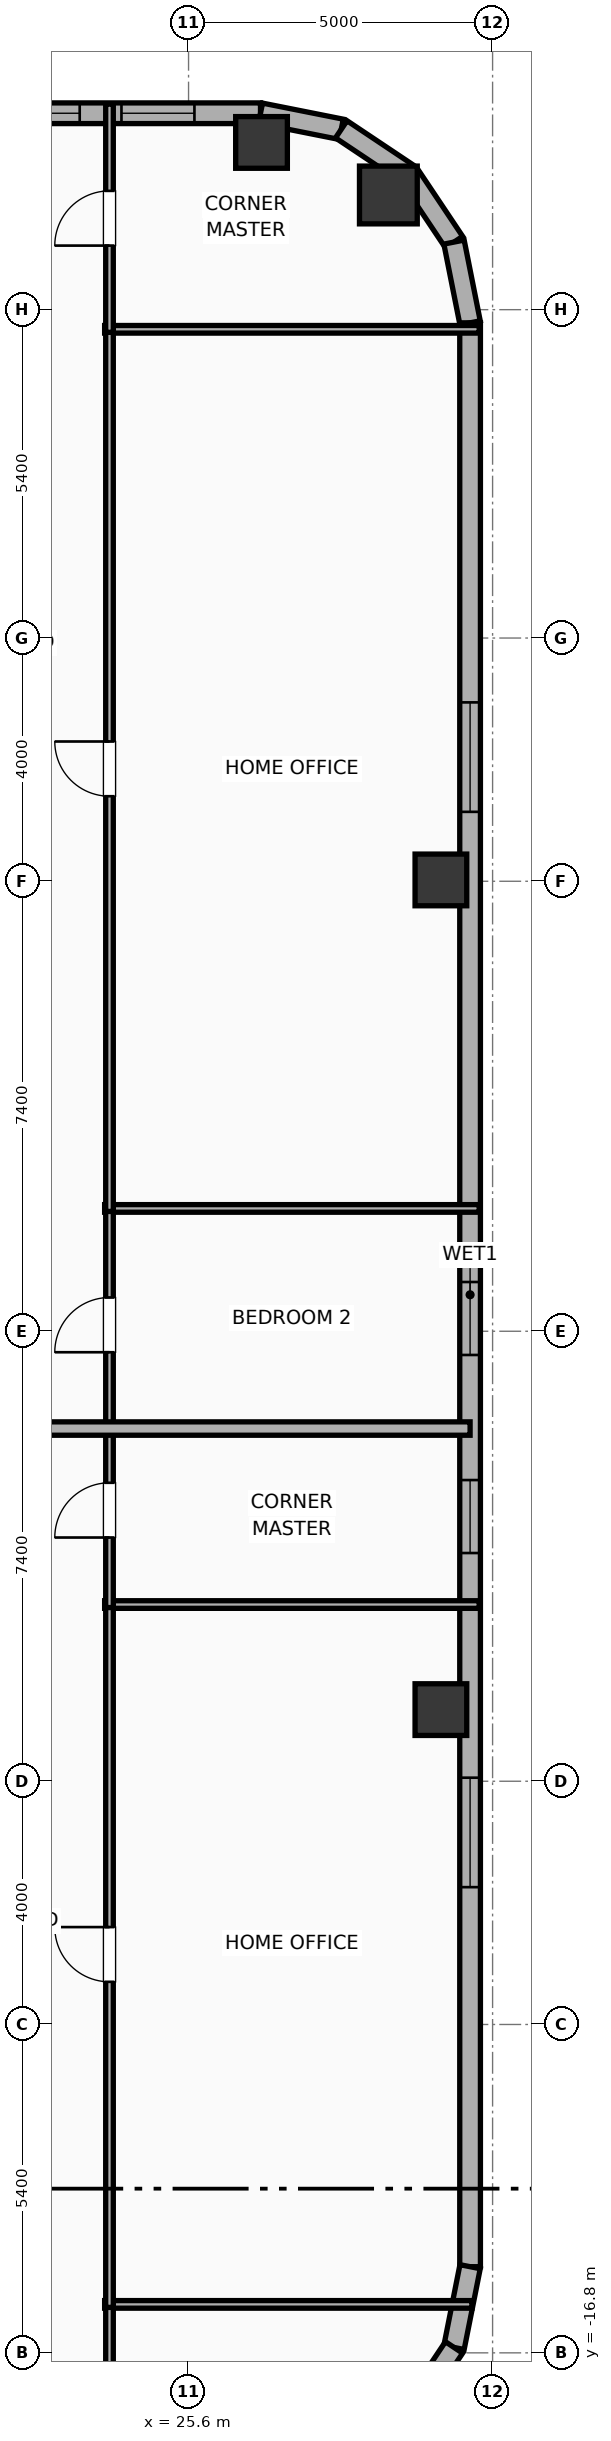
"""IFC4 building model, lengths in metres.
Left out: names, types, materials, properties, quantities, classifications, styles, units other than length and angle.
Written with IfcOpenShell. Run it as: python <this file> out.ifc"""

import sys

from ifc_helpers import new_model, si_unit, direction, frame, frame_2d, origin, origin_2d, place, context, subcontext, project, spatial, rectangle, hollow_rectangle, hollow_circle, extrude, element, fill, save


model = new_model("IFC4")
c1 = context("Model", 3, precision=1e-05, world=origin(), true_north=direction((0.0, 1.0)))
c2 = subcontext(c1, "Body", "Model", "MODEL_VIEW")
j1 = project(units=[si_unit("LENGTHUNIT", "METRE"), si_unit("PLANEANGLEUNIT", "RADIAN")], contexts=[c1])
p1 = place(None, origin())
s1 = spatial("IfcSite", under=j1, at=p1, CompositionType="ELEMENT")
p2 = place(p1, origin())
s2 = spatial("IfcBuilding", under=s1, at=p2, CompositionType="ELEMENT")
p3 = place(p2, frame((0.0, 0.0, 200.2)))
s3 = spatial("IfcBuildingStorey", under=s2, at=p3, CompositionType="ELEMENT", Elevation=200.2)
for number, where, z_axis, x_axis in (
    (1, (29.75, -6.222, 0.0), (0.0, 0.0, 1.0), (1.0, 0.0, 0.0)),
    (2, (29.75, 7.422, 0.0), (0.0, 0.0, 1.0), (1.0, 0.0, 0.0)),
):
    element("IfcColumn", number, at=place(p3, frame(where, z_axis=z_axis, x_axis=x_axis)), inside=s3, PredefinedType="COLUMN", context=c2, shape_type="SweptSolid", body=[
        extrude(hollow_rectangle(XDim=0.85, YDim=0.85, WallThickness=0.028, at=origin_2d()), origin(), (0.0, 0.0, 1.0), 3.9),
    ])
p4 = place(p3, frame((28.886, 18.686, 0.0), z_axis=(0.0, 0.0, 1.0), x_axis=(1.0, 0.0, 0.0)))
e3 = element("IfcColumn", 3, at=p4, inside=s3, PredefinedType="COLUMN", context=c2, shape_type="SweptSolid", body=[
    extrude(hollow_circle(Radius=0.475, WallThickness=0.032, at=origin_2d()), origin(), (0.0, 0.0, 1.0), 3.9),
])
p5 = place(p3, frame((26.8, 19.55, 0.0), z_axis=(0.0, 0.0, 1.0), x_axis=(1.0, 0.0, 0.0)))
e4 = element("IfcColumn", 4, at=p5, inside=s3, PredefinedType="COLUMN", context=c2, shape_type="SweptSolid", body=[
    extrude(hollow_rectangle(XDim=0.85, YDim=0.85, WallThickness=0.028, at=origin_2d()), origin(), (0.0, 0.0, 1.0), 3.9),
])
p6 = place(p3, frame((-22.783, 20.03, 0.0), z_axis=(0.0, 0.0, 1.0), x_axis=(1.0, 0.0, 0.0)))
e5 = element("IfcWall", 5, at=p6, inside=s3, PredefinedType="ELEMENTEDWALL", context=c2, shape_type="SweptSolid", body=[
    extrude(rectangle(XDim=49.566, YDim=0.34, at=frame_2d((24.783, 0.0))), origin(), (0.0, 0.0, 1.0), 2.54),
])
p7 = place(p6, frame((6.211, 0.0, 0.75)))
e6 = element("IfcOpeningElement", 6, at=p7, cuts=e5, PredefinedType="OPENING", context=c2, shape_type="SweptSolid", body=[
    extrude(rectangle(XDim=2.4, YDim=1.63, at=frame_2d((1.2, 0.815))), frame((0.0, 0.18, 0.0), z_axis=(0.0, -1.0, 0.0), x_axis=(1.0, 0.0, 0.0)), (0.0, 0.0, 1.0), 0.36),
])
p8 = place(p6, frame((23.583, 0.0, 0.75)))
e7 = element("IfcOpeningElement", 7, at=p8, cuts=e5, PredefinedType="OPENING", context=c2, shape_type="SweptSolid", body=[
    extrude(rectangle(XDim=2.4, YDim=1.63, at=frame_2d((1.2, 0.815))), frame((0.0, 0.18, 0.0), z_axis=(0.0, -1.0, 0.0), x_axis=(1.0, 0.0, 0.0)), (0.0, 0.0, 1.0), 0.36),
])
p9 = place(p6, frame((3.893, 0.0, 0.75)))
e8 = element("IfcOpeningElement", 8, at=p9, cuts=e5, PredefinedType="OPENING", context=c2, shape_type="SweptSolid", body=[
    extrude(rectangle(XDim=1.2, YDim=1.63, at=frame_2d((0.6, 0.815))), frame((0.0, 0.18, 0.0), z_axis=(0.0, -1.0, 0.0), x_axis=(1.0, 0.0, 0.0)), (0.0, 0.0, 1.0), 0.36),
])
p10 = place(p6, frame((11.273, 0.0, 0.75)))
e9 = element("IfcOpeningElement", 9, at=p10, cuts=e5, PredefinedType="OPENING", context=c2, shape_type="SweptSolid", body=[
    extrude(rectangle(XDim=1.2, YDim=1.63, at=frame_2d((0.6, 0.815))), frame((0.0, 0.18, 0.0), z_axis=(0.0, -1.0, 0.0), x_axis=(1.0, 0.0, 0.0)), (0.0, 0.0, 1.0), 0.36),
])
p11 = place(p6, frame((31.889, 0.0, 0.75)))
e10 = element("IfcOpeningElement", 10, at=p11, cuts=e5, PredefinedType="OPENING", context=c2, shape_type="SweptSolid", body=[
    extrude(rectangle(XDim=1.2, YDim=1.63, at=frame_2d((0.6, 0.815))), frame((0.0, 0.18, 0.0), z_axis=(0.0, -1.0, 0.0), x_axis=(1.0, 0.0, 0.0)), (0.0, 0.0, 1.0), 0.36),
])
p12 = place(p6, frame((34.719, 0.0, 0.75)))
e11 = element("IfcOpeningElement", 11, at=p12, cuts=e5, PredefinedType="OPENING", context=c2, shape_type="SweptSolid", body=[
    extrude(rectangle(XDim=1.2, YDim=1.63, at=frame_2d((0.6, 0.815))), frame((0.0, 0.18, 0.0), z_axis=(0.0, -1.0, 0.0), x_axis=(1.0, 0.0, 0.0)), (0.0, 0.0, 1.0), 0.36),
])
p13 = place(p6, frame((37.823, 0.0, 0.75)))
e12 = element("IfcOpeningElement", 12, at=p13, cuts=e5, PredefinedType="OPENING", context=c2, shape_type="SweptSolid", body=[
    extrude(rectangle(XDim=1.2, YDim=1.63, at=frame_2d((0.6, 0.815))), frame((0.0, 0.18, 0.0), z_axis=(0.0, -1.0, 0.0), x_axis=(1.0, 0.0, 0.0)), (0.0, 0.0, 1.0), 0.36),
])
p14 = place(p6, frame((16.113, 0.0, 0.75)))
e13 = element("IfcOpeningElement", 13, at=p14, cuts=e5, PredefinedType="OPENING", context=c2, shape_type="SweptSolid", body=[
    extrude(rectangle(XDim=1.2, YDim=1.63, at=frame_2d((0.6, 0.815))), frame((0.0, 0.18, 0.0), z_axis=(0.0, -1.0, 0.0), x_axis=(1.0, 0.0, 0.0)), (0.0, 0.0, 1.0), 0.36),
])
p15 = place(p6, frame((20.513, 0.0, 0.75)))
e14 = element("IfcOpeningElement", 14, at=p15, cuts=e5, PredefinedType="OPENING", context=c2, shape_type="SweptSolid", body=[
    extrude(rectangle(XDim=1.2, YDim=1.63, at=frame_2d((0.6, 0.815))), frame((0.0, 0.18, 0.0), z_axis=(0.0, -1.0, 0.0), x_axis=(1.0, 0.0, 0.0)), (0.0, 0.0, 1.0), 0.36),
])
p16 = place(p6, frame((27.893, 0.0, 0.75)))
e15 = element("IfcOpeningElement", 15, at=p16, cuts=e5, PredefinedType="OPENING", context=c2, shape_type="SweptSolid", body=[
    extrude(rectangle(XDim=1.2, YDim=1.63, at=frame_2d((0.6, 0.815))), frame((0.0, 0.18, 0.0), z_axis=(0.0, -1.0, 0.0), x_axis=(1.0, 0.0, 0.0)), (0.0, 0.0, 1.0), 0.36),
])
p17 = place(p6, frame((45.393, 0.0, 0.75)))
e16 = element("IfcOpeningElement", 16, at=p17, cuts=e5, PredefinedType="OPENING", context=c2, shape_type="SweptSolid", body=[
    extrude(rectangle(XDim=1.2, YDim=1.63, at=frame_2d((0.6, 0.815))), frame((0.0, 0.18, 0.0), z_axis=(0.0, -1.0, 0.0), x_axis=(1.0, 0.0, 0.0)), (0.0, 0.0, 1.0), 0.36),
])
p18 = place(p6, frame((47.28, 0.0, 0.75)))
e17 = element("IfcOpeningElement", 17, at=p18, cuts=e5, PredefinedType="OPENING", context=c2, shape_type="SweptSolid", body=[
    extrude(rectangle(XDim=1.2, YDim=1.63, at=frame_2d((0.6, 0.815))), frame((0.0, 0.18, 0.0), z_axis=(0.0, -1.0, 0.0), x_axis=(1.0, 0.0, 0.0)), (0.0, 0.0, 1.0), 0.36),
])
p19 = place(p3, frame((26.783, 20.03, 0.0), z_axis=(0.0, 0.0, 1.0), x_axis=(0.980788153188, -0.195075878998, 0.0)))
e18 = element("IfcWall", 18, at=p19, inside=s3, PredefinedType="ELEMENTEDWALL", context=c2, shape_type="SweptSolid", body=[
    extrude(rectangle(XDim=1.354, YDim=0.34, at=frame_2d((0.677, 0.0))), origin(), (0.0, 0.0, 1.0), 2.54),
])
p20 = place(p3, frame((28.111, 19.766, 0.0), z_axis=(0.0, 0.0, 1.0), x_axis=(0.831403586725, -0.555669034571, 0.0)))
e19 = element("IfcWall", 19, at=p20, inside=s3, PredefinedType="ELEMENTEDWALL", context=c2, shape_type="SweptSolid", body=[
    extrude(rectangle(XDim=1.337, YDim=0.34, at=frame_2d((0.668, 0.0))), origin(), (0.0, 0.0, 1.0), 2.54),
])
p21 = place(p3, frame((29.223, 19.023, 0.0), z_axis=(0.0, 0.0, 1.0), x_axis=(0.555669034571, -0.831403586725, 0.0)))
e20 = element("IfcWall", 20, at=p21, inside=s3, PredefinedType="ELEMENTEDWALL", context=c2, shape_type="SweptSolid", body=[
    extrude(rectangle(XDim=1.337, YDim=0.34, at=frame_2d((0.668, 0.0))), origin(), (0.0, 0.0, 1.0), 3.65),
])
p22 = place(p3, frame((29.966, 17.911, 0.0), z_axis=(0.0, 0.0, 1.0), x_axis=(0.195075878998, -0.980788153188, 0.0)))
e21 = element("IfcWall", 21, at=p22, inside=s3, PredefinedType="ELEMENTEDWALL", context=c2, shape_type="SweptSolid", body=[
    extrude(rectangle(XDim=1.354, YDim=0.34, at=frame_2d((0.677, 0.0))), origin(), (0.0, 0.0, 1.0), 3.65),
])
p23 = place(p3, frame((30.23, 16.583, 0.0), z_axis=(0.0, 0.0, 1.0), x_axis=(0.0, -1.0, 0.0)))
e22 = element("IfcWall", 22, at=p23, inside=s3, PredefinedType="ELEMENTEDWALL", context=c2, shape_type="SweptSolid", body=[
    extrude(rectangle(XDim=31.967, YDim=0.34, at=frame_2d((15.983, 0.0))), origin(), (0.0, 0.0, 1.0), 2.54),
])
p24 = place(p23, frame((6.242, 0.0, 0.75)))
e23 = element("IfcOpeningElement", 23, at=p24, cuts=e22, PredefinedType="OPENING", context=c2, shape_type="SweptSolid", body=[
    extrude(rectangle(XDim=1.8, YDim=1.63, at=frame_2d((0.9, 0.815))), frame((0.0, 0.18, 0.0), z_axis=(0.0, -1.0, 0.0), x_axis=(1.0, 0.0, 0.0)), (0.0, 0.0, 1.0), 0.36),
])
p25 = place(p23, frame((23.925, 0.0, 0.75)))
e24 = element("IfcOpeningElement", 24, at=p25, cuts=e22, PredefinedType="OPENING", context=c2, shape_type="SweptSolid", body=[
    extrude(rectangle(XDim=1.8, YDim=1.63, at=frame_2d((0.9, 0.815))), frame((0.0, 0.18, 0.0), z_axis=(0.0, -1.0, 0.0), x_axis=(1.0, 0.0, 0.0)), (0.0, 0.0, 1.0), 0.36),
])
p26 = place(p23, frame((19.03, 0.0, 0.75)))
e25 = element("IfcOpeningElement", 25, at=p26, cuts=e22, PredefinedType="OPENING", context=c2, shape_type="SweptSolid", body=[
    extrude(rectangle(XDim=1.2, YDim=1.63, at=frame_2d((0.6, 0.815))), frame((0.0, 0.18, 0.0), z_axis=(0.0, -1.0, 0.0), x_axis=(1.0, 0.0, 0.0)), (0.0, 0.0, 1.0), 0.36),
])
p27 = place(p23, frame((15.773, 0.0, 0.75)))
e26 = element("IfcOpeningElement", 26, at=p27, cuts=e22, PredefinedType="OPENING", context=c2, shape_type="SweptSolid", body=[
    extrude(rectangle(XDim=1.2, YDim=1.63, at=frame_2d((0.6, 0.815))), frame((0.0, 0.18, 0.0), z_axis=(0.0, -1.0, 0.0), x_axis=(1.0, 0.0, 0.0)), (0.0, 0.0, 1.0), 0.36),
])
p28 = place(p3, frame((30.23, -15.383, 0.0), z_axis=(0.0, 0.0, 1.0), x_axis=(-0.195110379894, -0.98078129043, 0.0)))
e27 = element("IfcWall", 27, at=p28, inside=s3, PredefinedType="ELEMENTEDWALL", context=c2, shape_type="SweptSolid", body=[
    extrude(rectangle(XDim=1.354, YDim=0.34, at=frame_2d((0.677, 0.0))), origin(), (0.0, 0.0, 1.0), 3.65),
])
p29 = place(p3, frame((29.966, -16.711, 0.0), z_axis=(0.0, 0.0, 1.0), x_axis=(-0.555584683399, -0.831459956686, 0.0)))
e28 = element("IfcWall", 28, at=p29, inside=s3, PredefinedType="ELEMENTEDWALL", context=c2, shape_type="SweptSolid", body=[
    extrude(rectangle(XDim=1.337, YDim=0.34, at=frame_2d((0.668, 0.0))), origin(), (0.0, 0.0, 1.0), 3.65),
])
p30 = place(p3, frame((24.22, -16.003, 0.0), z_axis=(0.0, 0.0, 1.0), x_axis=(1.0, 0.0, 0.0)))
e29 = element("IfcWall", 29, at=p30, inside=s3, PredefinedType="PARTITIONING", context=c2, shape_type="SweptSolid", body=[
    extrude(rectangle(XDim=6.04, YDim=0.125, at=frame_2d((3.02, 0.0))), origin(), (0.0, 0.0, 1.0), 3.65),
])
p31 = place(p3, frame((24.22, -4.494, 0.0), z_axis=(0.0, 0.0, 1.0), x_axis=(1.0, 0.0, 0.0)))
e30 = element("IfcWall", 30, at=p31, inside=s3, PredefinedType="PARTITIONING", context=c2, shape_type="SweptSolid", body=[
    extrude(rectangle(XDim=6.16, YDim=0.125, at=frame_2d((3.08, 0.0))), origin(), (0.0, 0.0, 1.0), 3.65),
])
p32 = place(p3, frame((24.3, -18.98, 0.0), z_axis=(0.0, 0.0, 1.0), x_axis=(0.0, 1.0, 0.0)))
e31 = element("IfcWall", 31, at=p32, inside=s3, PredefinedType="PARTITIONING", context=c2, shape_type="SweptSolid", body=[
    extrude(rectangle(XDim=3.027, YDim=0.125, at=frame_2d((1.514, 0.0))), origin(), (0.0, 0.0, 1.0), 3.65),
])
p33 = place(p32, frame((1.063, 0.0, 0.0)))
e32 = element("IfcOpeningElement", 32, at=p33, cuts=e31, PredefinedType="OPENING", context=c2, shape_type="SweptSolid", body=[
    extrude(rectangle(XDim=0.9, YDim=2.05, at=frame_2d((0.45, 1.025))), frame((0.0, 0.073, 0.0), z_axis=(0.0, -1.0, 0.0), x_axis=(1.0, 0.0, 0.0)), (0.0, 0.0, 1.0), 0.145),
])
p34 = place(p3, frame((24.3, -16.053, 0.0), z_axis=(0.0, 0.0, 1.0), x_axis=(0.0, 1.0, 0.0)))
e33 = element("IfcWall", 33, at=p34, inside=s3, PredefinedType="PARTITIONING", context=c2, shape_type="SweptSolid", body=[
    extrude(rectangle(XDim=11.609, YDim=0.125, at=frame_2d((5.804, 0.0))), origin(), (0.0, 0.0, 1.0), 3.65),
])
p35 = place(p34, frame((5.354, 0.0, 0.0)))
e34 = element("IfcOpeningElement", 34, at=p35, cuts=e33, PredefinedType="OPENING", context=c2, shape_type="SweptSolid", body=[
    extrude(rectangle(XDim=0.9, YDim=2.05, at=frame_2d((0.45, 1.025))), frame((0.0, 0.073, 0.0), z_axis=(0.0, -1.0, 0.0), x_axis=(1.0, 0.0, 0.0)), (0.0, 0.0, 1.0), 0.145),
])
p36 = place(p3, frame((24.3, -4.544, 0.0), z_axis=(0.0, 0.0, 1.0), x_axis=(0.0, 1.0, 0.0)))
e35 = element("IfcWall", 35, at=p36, inside=s3, PredefinedType="PARTITIONING", context=c2, shape_type="SweptSolid", body=[
    extrude(rectangle(XDim=3.006, YDim=0.125, at=frame_2d((1.503, 0.0))), origin(), (0.0, 0.0, 1.0), 3.65),
])
p37 = place(p36, frame((1.152, 0.0, 0.0)))
e36 = element("IfcOpeningElement", 36, at=p37, cuts=e35, PredefinedType="OPENING", context=c2, shape_type="SweptSolid", body=[
    extrude(rectangle(XDim=0.9, YDim=2.05, at=frame_2d((0.45, 1.025))), frame((0.0, 0.073, 0.0), z_axis=(0.0, -1.0, 0.0), x_axis=(1.0, 0.0, 0.0)), (0.0, 0.0, 1.0), 0.145),
])
for number, where, z_axis, x_axis in (
    (37, (24.22, 2.02, 0.0), (0.0, 0.0, 1.0), (1.0, 0.0, 0.0)),
    (38, (24.22, 16.477, 0.0), (0.0, 0.0, 1.0), (1.0, 0.0, 0.0)),
):
    element("IfcWall", number, at=place(p3, frame(where, z_axis=z_axis, x_axis=x_axis)), inside=s3, PredefinedType="PARTITIONING", context=c2, shape_type="SweptSolid", body=[
        extrude(rectangle(XDim=6.16, YDim=0.125, at=frame_2d((3.08, 0.0))), origin(), (0.0, 0.0, 1.0), 3.65),
    ])
p38 = place(p3, frame((24.3, -1.663, 0.0), z_axis=(0.0, 0.0, 1.0), x_axis=(0.0, 1.0, 0.0)))
e39 = element("IfcWall", 39, at=p38, inside=s3, PredefinedType="PARTITIONING", context=c2, shape_type="SweptSolid", body=[
    extrude(rectangle(XDim=3.733, YDim=0.125, at=frame_2d((1.866, 0.0))), origin(), (0.0, 0.0, 1.0), 3.65),
])
p39 = place(p38, frame((1.317, 0.0, 0.0)))
e40 = element("IfcOpeningElement", 40, at=p39, cuts=e39, PredefinedType="OPENING", context=c2, shape_type="SweptSolid", body=[
    extrude(rectangle(XDim=0.9, YDim=2.05, at=frame_2d((0.45, 1.025))), frame((0.0, 0.073, 0.0), z_axis=(0.0, -1.0, 0.0), x_axis=(1.0, 0.0, 0.0)), (0.0, 0.0, 1.0), 0.145),
])
p40 = place(p3, frame((24.3, 1.97, 0.0), z_axis=(0.0, 0.0, 1.0), x_axis=(0.0, 1.0, 0.0)))
e41 = element("IfcWall", 41, at=p40, inside=s3, PredefinedType="PARTITIONING", context=c2, shape_type="SweptSolid", body=[
    extrude(rectangle(XDim=14.557, YDim=0.125, at=frame_2d((7.279, 0.0))), origin(), (0.0, 0.0, 1.0), 3.65),
])
p41 = place(p40, frame((6.829, 0.0, 0.0)))
e42 = element("IfcOpeningElement", 42, at=p41, cuts=e41, PredefinedType="OPENING", context=c2, shape_type="SweptSolid", body=[
    extrude(rectangle(XDim=0.9, YDim=2.05, at=frame_2d((0.45, 1.025))), frame((0.0, 0.073, 0.0), z_axis=(0.0, -1.0, 0.0), x_axis=(1.0, 0.0, 0.0)), (0.0, 0.0, 1.0), 0.145),
])
p42 = place(p3, frame((24.3, 16.427, 0.0), z_axis=(0.0, 0.0, 1.0), x_axis=(0.0, 1.0, 0.0)))
e43 = element("IfcWall", 43, at=p42, inside=s3, PredefinedType="PARTITIONING", context=c2, shape_type="SweptSolid", body=[
    extrude(rectangle(XDim=3.753, YDim=0.125, at=frame_2d((1.876, 0.0))), origin(), (0.0, 0.0, 1.0), 3.65),
])
p43 = place(p42, frame((1.427, 0.0, 0.0)))
e44 = element("IfcOpeningElement", 44, at=p43, cuts=e43, PredefinedType="OPENING", context=c2, shape_type="SweptSolid", body=[
    extrude(rectangle(XDim=0.9, YDim=2.05, at=frame_2d((0.45, 1.025))), frame((0.0, 0.073, 0.0), z_axis=(0.0, -1.0, 0.0), x_axis=(1.0, 0.0, 0.0)), (0.0, 0.0, 1.0), 0.145),
])
p44 = place(p3, frame((19.47, -1.6, 0.0), z_axis=(0.0, 0.0, 1.0), x_axis=(1.0, 0.0, 0.0)))
e45 = element("IfcWall", 45, at=p44, inside=s3, PredefinedType="PARTITIONING", context=c2, shape_type="SweptSolid", body=[
    extrude(rectangle(XDim=10.76, YDim=0.22, at=frame_2d((5.38, 0.0))), origin(), (0.0, 0.0, 1.0), 3.65),
])
p45 = place(p24, origin())
e46 = element("IfcWindow", 46, at=p45, inside=s3, PartitioningType="SINGLE_PANEL", PredefinedType="WINDOW", context=c2, shape_type="SweptSolid", body=[
    extrude(rectangle(XDim=1.8, YDim=1.63, at=frame_2d((0.9, 0.815))), frame((0.0, 0.03, 0.0), z_axis=(0.0, -1.0, 0.0), x_axis=(1.0, 0.0, 0.0)), (0.0, 0.0, 1.0), 0.06),
])
fill(e23, e46)
p46 = place(p25, origin())
e47 = element("IfcWindow", 47, at=p46, inside=s3, PartitioningType="SINGLE_PANEL", PredefinedType="WINDOW", context=c2, shape_type="SweptSolid", body=[
    extrude(rectangle(XDim=1.8, YDim=1.63, at=frame_2d((0.9, 0.815))), frame((0.0, 0.03, 0.0), z_axis=(0.0, -1.0, 0.0), x_axis=(1.0, 0.0, 0.0)), (0.0, 0.0, 1.0), 0.06),
])
fill(e24, e47)
p47 = place(p26, origin())
e48 = element("IfcWindow", 48, at=p47, inside=s3, PartitioningType="SINGLE_PANEL", PredefinedType="WINDOW", context=c2, shape_type="SweptSolid", body=[
    extrude(rectangle(XDim=1.2, YDim=1.63, at=frame_2d((0.6, 0.815))), frame((0.0, 0.03, 0.0), z_axis=(0.0, -1.0, 0.0), x_axis=(1.0, 0.0, 0.0)), (0.0, 0.0, 1.0), 0.06),
])
fill(e25, e48)
p48 = place(p17, origin())
e49 = element("IfcWindow", 49, at=p48, inside=s3, PartitioningType="SINGLE_PANEL", PredefinedType="WINDOW", context=c2, shape_type="SweptSolid", body=[
    extrude(rectangle(XDim=1.2, YDim=1.63, at=frame_2d((0.6, 0.815))), frame((0.0, 0.03, 0.0), z_axis=(0.0, -1.0, 0.0), x_axis=(1.0, 0.0, 0.0)), (0.0, 0.0, 1.0), 0.06),
])
fill(e16, e49)
p49 = place(p18, origin())
e50 = element("IfcWindow", 50, at=p49, inside=s3, PartitioningType="SINGLE_PANEL", PredefinedType="WINDOW", context=c2, shape_type="SweptSolid", body=[
    extrude(rectangle(XDim=1.2, YDim=1.63, at=frame_2d((0.6, 0.815))), frame((0.0, 0.03, 0.0), z_axis=(0.0, -1.0, 0.0), x_axis=(1.0, 0.0, 0.0)), (0.0, 0.0, 1.0), 0.06),
])
fill(e17, e50)
p50 = place(p27, origin())
e51 = element("IfcWindow", 51, at=p50, inside=s3, PartitioningType="SINGLE_PANEL", PredefinedType="WINDOW", context=c2, shape_type="SweptSolid", body=[
    extrude(rectangle(XDim=1.2, YDim=1.63, at=frame_2d((0.6, 0.815))), frame((0.0, 0.03, 0.0), z_axis=(0.0, -1.0, 0.0), x_axis=(1.0, 0.0, 0.0)), (0.0, 0.0, 1.0), 0.06),
])
fill(e26, e51)
p51 = place(p35, origin())
e52 = element("IfcDoor", 52, at=p51, inside=s3, OperationType="SINGLE_SWING_RIGHT", PredefinedType="DOOR", context=c2, shape_type="SweptSolid", body=[
    extrude(rectangle(XDim=0.9, YDim=2.05, at=frame_2d((0.45, 1.025))), frame((0.0, 0.025, 0.0), z_axis=(0.0, -1.0, 0.0), x_axis=(1.0, 0.0, 0.0)), (0.0, 0.0, 1.0), 0.05),
])
fill(e34, e52)
p52 = place(p37, origin())
e53 = element("IfcDoor", 53, at=p52, inside=s3, OperationType="SINGLE_SWING_LEFT", PredefinedType="DOOR", context=c2, shape_type="SweptSolid", body=[
    extrude(rectangle(XDim=0.9, YDim=2.05, at=frame_2d((0.45, 1.025))), frame((0.0, 0.025, 0.0), z_axis=(0.0, -1.0, 0.0), x_axis=(1.0, 0.0, 0.0)), (0.0, 0.0, 1.0), 0.05),
])
fill(e36, e53)
p53 = place(p39, origin())
e54 = element("IfcDoor", 54, at=p53, inside=s3, OperationType="SINGLE_SWING_LEFT", PredefinedType="DOOR", context=c2, shape_type="SweptSolid", body=[
    extrude(rectangle(XDim=0.9, YDim=2.05, at=frame_2d((0.45, 1.025))), frame((0.0, 0.025, 0.0), z_axis=(0.0, -1.0, 0.0), x_axis=(1.0, 0.0, 0.0)), (0.0, 0.0, 1.0), 0.05),
])
fill(e40, e54)
p54 = place(p41, origin())
e55 = element("IfcDoor", 55, at=p54, inside=s3, OperationType="SINGLE_SWING_RIGHT", PredefinedType="DOOR", context=c2, shape_type="SweptSolid", body=[
    extrude(rectangle(XDim=0.9, YDim=2.05, at=frame_2d((0.45, 1.025))), frame((0.0, 0.025, 0.0), z_axis=(0.0, -1.0, 0.0), x_axis=(1.0, 0.0, 0.0)), (0.0, 0.0, 1.0), 0.05),
])
fill(e42, e55)
p55 = place(p43, origin())
e56 = element("IfcDoor", 56, at=p55, inside=s3, OperationType="SINGLE_SWING_LEFT", PredefinedType="DOOR", context=c2, shape_type="SweptSolid", body=[
    extrude(rectangle(XDim=0.9, YDim=2.05, at=frame_2d((0.45, 1.025))), frame((0.0, 0.025, 0.0), z_axis=(0.0, -1.0, 0.0), x_axis=(1.0, 0.0, 0.0)), (0.0, 0.0, 1.0), 0.05),
])
fill(e44, e56)
save(model, sys.argv[1])
